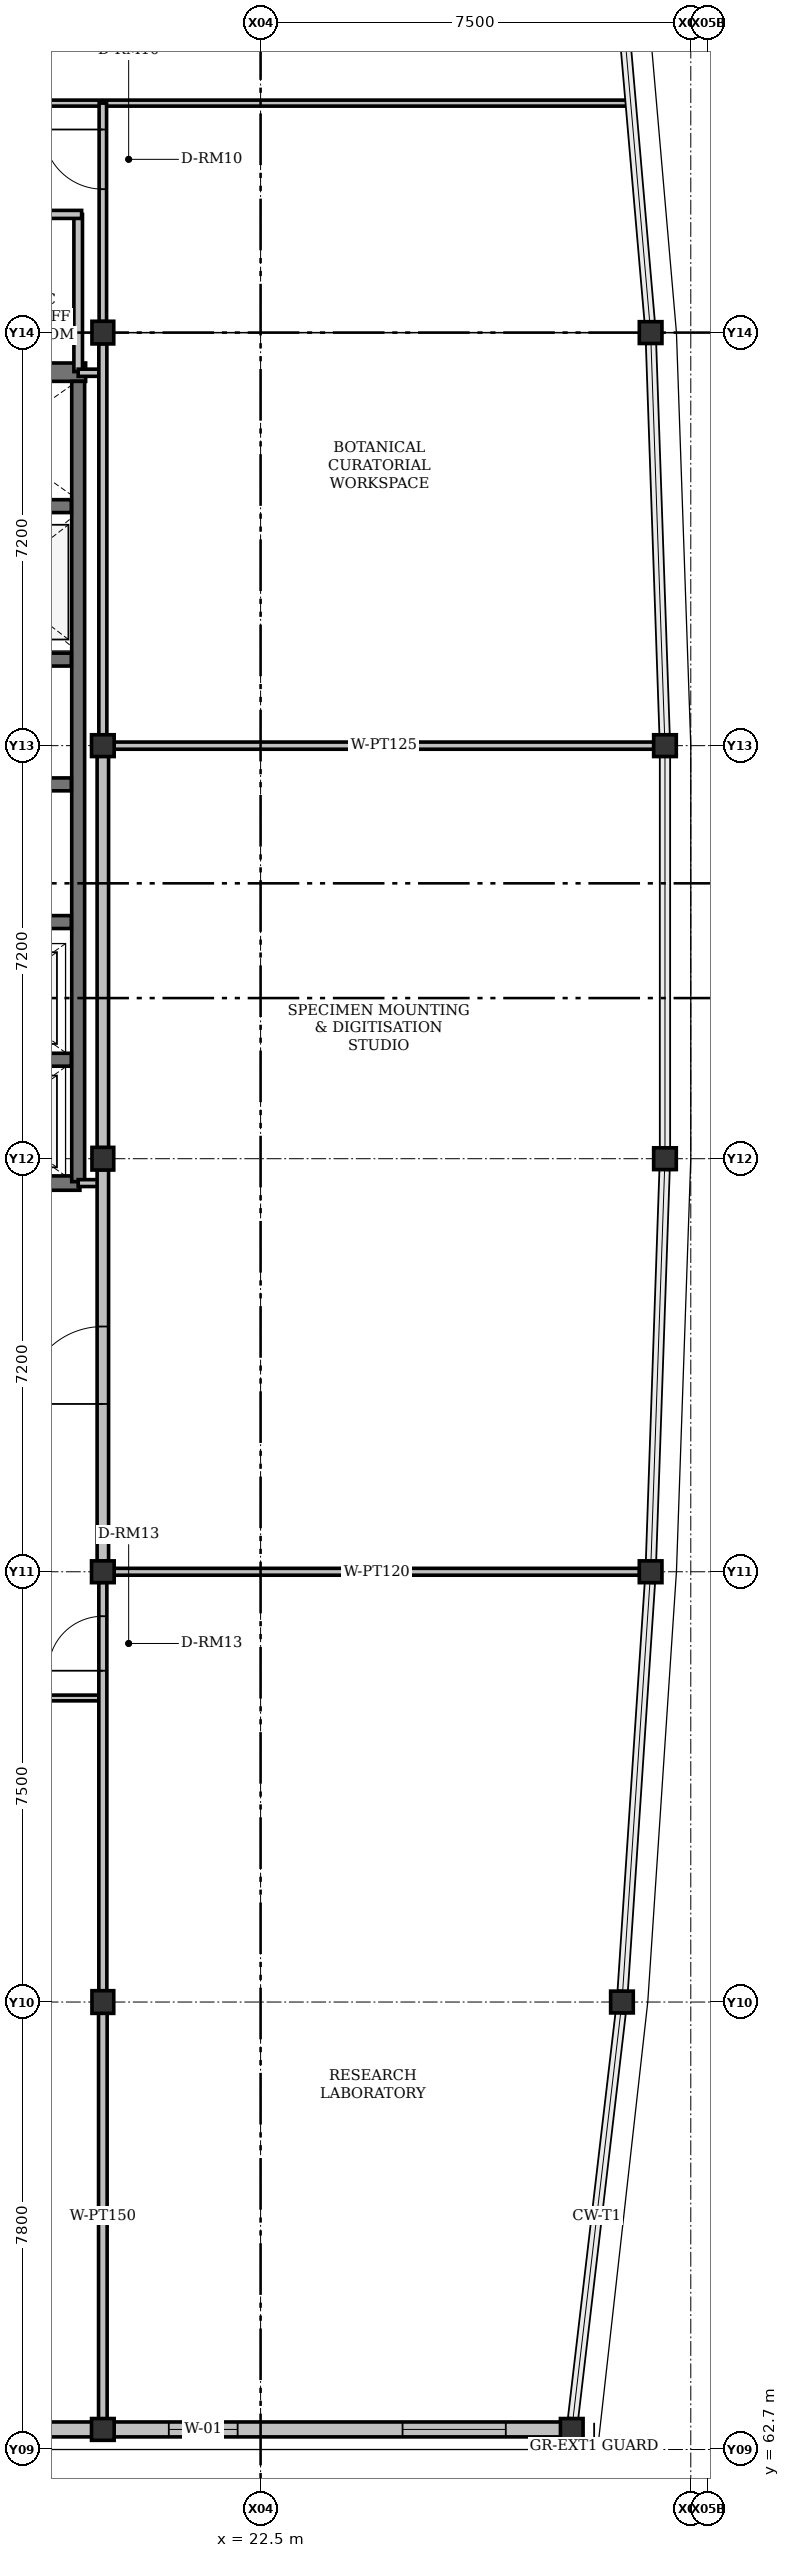
"""IFC4 building model, lengths in metres.
Left out: names, types, materials, properties, quantities, classifications, styles, units other than length and angle.
Written with IfcOpenShell. Run it as: python <this file> out.ifc"""

import sys

from ifc_helpers import new_model, si_unit, direction, frame, frame_2d, origin, origin_2d, place, context, subcontext, project, spatial, rectangle, i_section, extrude, element, fill, save


model = new_model("IFC4")
c1 = context("Model", 3, precision=1e-05, world=origin(), true_north=direction((0.0, 1.0)))
c2 = subcontext(c1, "Body", "Model", "MODEL_VIEW")
j1 = project(units=[si_unit("LENGTHUNIT", "METRE"), si_unit("PLANEANGLEUNIT", "RADIAN")], contexts=[c1])
p1 = place(None, origin())
s1 = spatial("IfcSite", under=j1, at=p1, CompositionType="ELEMENT")
p2 = place(p1, origin())
s2 = spatial("IfcBuilding", under=s1, at=p2, CompositionType="ELEMENT")
p3 = place(p2, frame((0.0, 0.0, 18.3)))
s3 = spatial("IfcBuildingStorey", under=s2, at=p3, CompositionType="ELEMENT", Elevation=18.3)
for number, where, z_axis, x_axis in (
    (1, (19.75, 63.05, 0.0), (0.0, 0.0, 1.0), (1.0, 0.0, 0.0)),
    (2, (27.925, 63.05, 0.0), (0.0, 0.0, 1.0), (1.0, 0.0, 0.0)),
    (3, (19.75, 70.5, 0.0), (0.0, 0.0, 1.0), (0.0, 1.0, 0.0)),
    (4, (28.8, 70.5, 0.0), (0.0, 0.0, 1.0), (1.0, 0.0, 0.0)),
    (5, (19.75, 78.0, 0.0), (0.0, 0.0, 1.0), (1.0, 0.0, 0.0)),
    (6, (29.3, 78.0, 0.0), (0.0, 0.0, 1.0), (1.0, 0.0, 0.0)),
    (7, (19.75, 85.2, 0.0), (0.0, 0.0, 1.0), (0.0, 1.0, 0.0)),
    (8, (29.55, 85.2, 0.0), (0.0, 0.0, 1.0), (1.0, 0.0, 0.0)),
    (9, (19.75, 92.4, 0.0), (0.0, 0.0, 1.0), (1.0, 0.0, 0.0)),
    (10, (29.55, 92.4, 0.0), (0.0, 0.0, 1.0), (1.0, 0.0, 0.0)),
    (11, (19.75, 99.6, 0.0), (0.0, 0.0, 1.0), (0.0, 1.0, 0.0)),
    (12, (29.3, 99.6, 0.0), (0.0, 0.0, 1.0), (1.0, 0.0, 0.0)),
):
    element("IfcColumn", number, at=place(p3, frame(where, z_axis=z_axis, x_axis=x_axis)), inside=s3, PredefinedType="COLUMN", context=c2, shape_type="SweptSolid", body=[
        extrude(i_section(OverallWidth=0.395, OverallDepth=0.38, WebThickness=0.019, FlangeThickness=0.03, FilletRadius=0.015, at=origin_2d()), origin(), (0.0, 0.0, 1.0), 4.2),
    ])
p4 = place(p3, frame((19.75, 63.05, 0.0), z_axis=(0.0, 0.0, 1.0), x_axis=(-1.0, 0.0, 0.0)))
e13 = element("IfcWall", 13, at=p4, inside=s3, PredefinedType="SOLIDWALL", context=c2, shape_type="SweptSolid", body=[
    extrude(rectangle(XDim=11.9, YDim=0.26, at=frame_2d((5.95, 0.0))), origin(), (0.0, 0.0, 1.0), 3.577),
])
p5 = place(p4, frame((1.15, 0.0, 0.92)))
e14 = element("IfcOpeningElement", 14, at=p5, cuts=e13, PredefinedType="OPENING", context=c2, shape_type="SweptSolid", body=[
    extrude(rectangle(XDim=2.1, YDim=1.55, at=frame_2d((1.05, 0.775))), frame((0.0, 0.13, 0.0), z_axis=(0.0, -1.0, 0.0), x_axis=(1.0, 0.0, 0.0)), (0.0, 0.0, 1.0), 0.26),
])
p6 = place(p4, frame((9.85, 0.0, 0.92)))
e15 = element("IfcOpeningElement", 15, at=p6, cuts=e13, PredefinedType="OPENING", context=c2, shape_type="SweptSolid", body=[
    extrude(rectangle(XDim=0.9, YDim=1.3, at=frame_2d((0.45, 0.65))), frame((0.0, 0.13, 0.0), z_axis=(0.0, -1.0, 0.0), x_axis=(1.0, 0.0, 0.0)), (0.0, 0.0, 1.0), 0.26),
])
p7 = place(p3, frame((27.925, 63.05, 0.0), z_axis=(0.0, 0.0, 1.0), x_axis=(-1.0, 0.0, 0.0)))
e16 = element("IfcWall", 16, at=p7, inside=s3, PredefinedType="SOLIDWALL", context=c2, shape_type="SweptSolid", body=[
    extrude(rectangle(XDim=8.175, YDim=0.26, at=frame_2d((4.087, 0.0))), origin(), (0.0, 0.0, 1.0), 2.79),
])
p8 = place(p7, frame((1.15, 0.0, 0.92)))
e17 = element("IfcOpeningElement", 17, at=p8, cuts=e16, PredefinedType="OPENING", context=c2, shape_type="SweptSolid", body=[
    extrude(rectangle(XDim=1.8, YDim=1.7, at=frame_2d((0.9, 0.85))), frame((0.0, 0.13, 0.0), z_axis=(0.0, -1.0, 0.0), x_axis=(1.0, 0.0, 0.0)), (0.0, 0.0, 1.0), 0.26),
])
p9 = place(p7, frame((5.825, 0.0, 0.92)))
e18 = element("IfcOpeningElement", 18, at=p9, cuts=e16, PredefinedType="OPENING", context=c2, shape_type="SweptSolid", body=[
    extrude(rectangle(XDim=1.2, YDim=1.4, at=frame_2d((0.6, 0.7))), frame((0.0, 0.13, 0.0), z_axis=(0.0, -1.0, 0.0), x_axis=(1.0, 0.0, 0.0)), (0.0, 0.0, 1.0), 0.26),
])
p10 = place(p3, frame((16.15, 98.91, 0.0), z_axis=(0.0, 0.0, 1.0), x_axis=(1.0, 0.0, 0.0)))
e19 = element("IfcWall", 19, at=p10, inside=s3, PredefinedType="SHEAR", context=c2, shape_type="SweptSolid", body=[
    extrude(rectangle(XDim=3.3, YDim=0.32, at=frame_2d((1.65, 0.0))), origin(), (0.0, 0.0, 1.0), 4.2),
])
p11 = place(p3, frame((16.4, 84.775, 0.0), z_axis=(0.0, 0.0, 1.0), x_axis=(1.0, 0.0, 0.0)))
e20 = element("IfcWall", 20, at=p11, inside=s3, PredefinedType="SHEAR", context=c2, shape_type="SweptSolid", body=[
    extrude(rectangle(XDim=2.95, YDim=0.25, at=frame_2d((1.475, 0.0))), origin(), (0.0, 0.0, 1.0), 4.2),
])
p12 = place(p3, frame((19.32, 84.8, 0.0), z_axis=(0.0, 0.0, 1.0), x_axis=(0.0, 1.0, 0.0)))
e21 = element("IfcWall", 21, at=p12, inside=s3, PredefinedType="SHEAR", context=c2, shape_type="SweptSolid", body=[
    extrude(rectangle(XDim=13.95, YDim=0.225, at=frame_2d((6.975, 0.0))), origin(), (0.0, 0.0, 1.0), 4.2),
])
for number, where, z_axis, x_axis in (
    (22, (16.4, 86.925, 0.0), (0.0, 0.0, 1.0), (1.0, 0.0, 0.0)),
    (23, (16.4, 89.325, 0.0), (0.0, 0.0, 1.0), (1.0, 0.0, 0.0)),
    (24, (16.4, 91.725, 0.0), (0.0, 0.0, 1.0), (1.0, 0.0, 0.0)),
    (25, (16.4, 93.9, 0.0), (0.0, 0.0, 1.0), (1.0, 0.0, 0.0)),
    (26, (16.4, 96.575, 0.0), (0.0, 0.0, 1.0), (1.0, 0.0, 0.0)),
):
    element("IfcWall", number, at=place(p3, frame(where, z_axis=z_axis, x_axis=x_axis)), inside=s3, PredefinedType="SHEAR", context=c2, shape_type="SweptSolid", body=[
        extrude(rectangle(XDim=2.8, YDim=0.225, at=frame_2d((1.4, 0.0))), origin(), (0.0, 0.0, 1.0), 4.2),
    ])
p13 = place(p3, frame((19.32, 98.92, 0.0), z_axis=(0.0, 0.0, 1.0), x_axis=(0.0, 1.0, 0.0)))
e27 = element("IfcWall", 27, at=p13, inside=s3, PredefinedType="PARTITIONING", context=c2, shape_type="SweptSolid", body=[
    extrude(rectangle(XDim=2.74, YDim=0.15, at=frame_2d((1.37, 0.0))), origin(), (0.0, 0.0, 1.0), 3.451),
])
p14 = place(p3, frame((19.38, 101.66, 0.0), z_axis=(0.0, 0.0, 1.0), x_axis=(-1.0, 0.0, 0.0)))
e28 = element("IfcWall", 28, at=p14, inside=s3, PredefinedType="PARTITIONING", context=c2, shape_type="SweptSolid", body=[
    extrude(rectangle(XDim=3.16, YDim=0.14, at=frame_2d((1.58, 0.0))), origin(), (0.0, 0.0, 1.0), 3.95),
])
p15 = place(p3, frame((19.75, 98.9, 0.0), z_axis=(0.0, 0.0, 1.0), x_axis=(-1.0, 0.0, 0.0)))
e29 = element("IfcWall", 29, at=p15, inside=s3, PredefinedType="PARTITIONING", context=c2, shape_type="SweptSolid", body=[
    extrude(rectangle(XDim=0.43, YDim=0.125, at=frame_2d((0.215, 0.0))), origin(), (0.0, 0.0, 1.0), 3.527),
])
p16 = place(p3, frame((19.32, 84.775, 0.0), z_axis=(0.0, 0.0, 1.0), x_axis=(1.0, 0.0, 0.0)))
e30 = element("IfcWall", 30, at=p16, inside=s3, PredefinedType="PARTITIONING", context=c2, shape_type="SweptSolid", body=[
    extrude(rectangle(XDim=0.43, YDim=0.12, at=frame_2d((0.215, 0.0))), origin(), (0.0, 0.0, 1.0), 3.527),
])
p17 = place(p3, frame((0.65, 103.6, 0.0), z_axis=(0.0, 0.0, 1.0), x_axis=(1.0, 0.0, 0.0)))
e31 = element("IfcWall", 31, at=p17, inside=s3, PredefinedType="PARTITIONING", context=c2, shape_type="SweptSolid", body=[
    extrude(rectangle(XDim=28.265, YDim=0.105, at=frame_2d((14.133, 0.0))), origin(), (0.0, 0.0, 1.0), 3.527),
])
p18 = place(p17, frame((9.47, 0.0, 0.0)))
e32 = element("IfcOpeningElement", 32, at=p18, cuts=e31, PredefinedType="OPENING", context=c2, shape_type="SweptSolid", body=[
    extrude(rectangle(XDim=0.96, YDim=2.15, at=frame_2d((0.48, 1.075))), frame((0.0, 0.052, 0.0), z_axis=(0.0, -1.0, 0.0), x_axis=(1.0, 0.0, 0.0)), (0.0, 0.0, 1.0), 0.105),
])
p19 = place(p17, frame((11.28, 0.0, 0.92)))
e33 = element("IfcOpeningElement", 33, at=p19, cuts=e31, PredefinedType="OPENING", context=c2, shape_type="SweptSolid", body=[
    extrude(rectangle(XDim=1.45, YDim=1.3, at=frame_2d((0.725, 0.65))), frame((0.0, 0.052, 0.0), z_axis=(0.0, -1.0, 0.0), x_axis=(1.0, 0.0, 0.0)), (0.0, 0.0, 1.0), 0.105),
])
p20 = place(p3, frame((19.75, 78.185, 0.0), z_axis=(0.0, 0.0, 1.0), x_axis=(0.0, 1.0, 0.0)))
e34 = element("IfcWall", 34, at=p20, inside=s3, PredefinedType="SOLIDWALL", context=c2, shape_type="SweptSolid", body=[
    extrude(rectangle(XDim=6.823, YDim=0.2, at=frame_2d((3.411, 0.0))), origin(), (0.0, 0.0, 1.0), 3.527),
])
p21 = place(p20, frame((2.74, 0.0, 0.0)))
e35 = element("IfcOpeningElement", 35, at=p21, cuts=e34, PredefinedType="OPENING", context=c2, shape_type="SweptSolid", body=[
    extrude(rectangle(XDim=1.35, YDim=2.25, at=frame_2d((0.675, 1.125))), frame((0.0, 0.1, 0.0), z_axis=(0.0, -1.0, 0.0), x_axis=(1.0, 0.0, 0.0)), (0.0, 0.0, 1.0), 0.2),
])
p22 = place(p3, frame((19.75, 85.393, 0.0), z_axis=(0.0, 0.0, 1.0), x_axis=(0.0, 1.0, 0.0)))
e36 = element("IfcWall", 36, at=p22, inside=s3, PredefinedType="SOLIDWALL", context=c2, shape_type="SweptSolid", body=[
    extrude(rectangle(XDim=6.823, YDim=0.2, at=frame_2d((3.411, 0.0))), origin(), (0.0, 0.0, 1.0), 3.527),
])
p23 = place(p3, frame((19.75, 92.585, 0.0), z_axis=(0.0, 0.0, 1.0), x_axis=(0.0, 1.0, 0.0)))
e37 = element("IfcWall", 37, at=p23, inside=s3, PredefinedType="PARTITIONING", context=c2, shape_type="SweptSolid", body=[
    extrude(rectangle(XDim=6.823, YDim=0.14, at=frame_2d((3.411, 0.0))), origin(), (0.0, 0.0, 1.0), 3.527),
])
p24 = place(p3, frame((19.75, 99.792, 0.0), z_axis=(0.0, 0.0, 1.0), x_axis=(0.0, 1.0, 0.0)))
e38 = element("IfcWall", 38, at=p24, inside=s3, PredefinedType="PARTITIONING", context=c2, shape_type="SweptSolid", body=[
    extrude(rectangle(XDim=3.808, YDim=0.13, at=frame_2d((1.904, 0.0))), origin(), (0.0, 0.0, 1.0), 3.527),
])
p25 = place(p24, frame((2.308, 0.0, 0.0)))
e39 = element("IfcOpeningElement", 39, at=p25, cuts=e38, PredefinedType="OPENING", context=c2, shape_type="SweptSolid", body=[
    extrude(rectangle(XDim=1.04, YDim=2.15, at=frame_2d((0.52, 1.075))), frame((0.0, 0.065, 0.0), z_axis=(0.0, -1.0, 0.0), x_axis=(1.0, 0.0, 0.0)), (0.0, 0.0, 1.0), 0.13),
])
p26 = place(p3, frame((29.357, 92.4, 0.0), z_axis=(0.0, 0.0, 1.0), x_axis=(-1.0, 0.0, 0.0)))
e40 = element("IfcWall", 40, at=p26, inside=s3, PredefinedType="PARTITIONING", context=c2, shape_type="SweptSolid", body=[
    extrude(rectangle(XDim=9.415, YDim=0.125, at=frame_2d((4.708, 0.0))), origin(), (0.0, 0.0, 1.0), 2.79),
])
p27 = place(p3, frame((29.107, 78.0, 0.0), z_axis=(0.0, 0.0, 1.0), x_axis=(-1.0, 0.0, 0.0)))
e41 = element("IfcWall", 41, at=p27, inside=s3, PredefinedType="PARTITIONING", context=c2, shape_type="SweptSolid", body=[
    extrude(rectangle(XDim=9.165, YDim=0.12, at=frame_2d((4.583, 0.0))), origin(), (0.0, 0.0, 1.0), 2.79),
])
p28 = place(p3, frame((7.85, 75.8, 0.0), z_axis=(0.0, 0.0, 1.0), x_axis=(1.0, 0.0, 0.0)))
e42 = element("IfcWall", 42, at=p28, inside=s3, PredefinedType="PARTITIONING", context=c2, shape_type="SweptSolid", body=[
    extrude(rectangle(XDim=11.9, YDim=0.1, at=frame_2d((5.95, 0.0))), origin(), (0.0, 0.0, 1.0), 3.527),
])
p29 = place(p28, frame((2.79, 0.0, 0.0)))
e43 = element("IfcOpeningElement", 43, at=p29, cuts=e42, PredefinedType="OPENING", context=c2, shape_type="SweptSolid", body=[
    extrude(rectangle(XDim=1.12, YDim=2.15, at=frame_2d((0.56, 1.075))), frame((0.0, 0.05, 0.0), z_axis=(0.0, -1.0, 0.0), x_axis=(1.0, 0.0, 0.0)), (0.0, 0.0, 1.0), 0.1),
])
p30 = place(p28, frame((4.76, 0.0, 0.92)))
e44 = element("IfcOpeningElement", 44, at=p30, cuts=e42, PredefinedType="OPENING", context=c2, shape_type="SweptSolid", body=[
    extrude(rectangle(XDim=0.85, YDim=1.1, at=frame_2d((0.425, 0.55))), frame((0.0, 0.05, 0.0), z_axis=(0.0, -1.0, 0.0), x_axis=(1.0, 0.0, 0.0)), (0.0, 0.0, 1.0), 0.1),
])
p31 = place(p3, frame((19.75, 63.235, 0.0), z_axis=(0.0, 0.0, 1.0), x_axis=(0.0, 1.0, 0.0)))
e45 = element("IfcWall", 45, at=p31, inside=s3, PredefinedType="PARTITIONING", context=c2, shape_type="SweptSolid", body=[
    extrude(rectangle(XDim=7.073, YDim=0.15, at=frame_2d((3.536, 0.0))), origin(), (0.0, 0.0, 1.0), 3.527),
])
p32 = place(p3, frame((19.75, 70.692, 0.0), z_axis=(0.0, 0.0, 1.0), x_axis=(0.0, 1.0, 0.0)))
e46 = element("IfcWall", 46, at=p32, inside=s3, PredefinedType="PARTITIONING", context=c2, shape_type="SweptSolid", body=[
    extrude(rectangle(XDim=7.123, YDim=0.14, at=frame_2d((3.561, 0.0))), origin(), (0.0, 0.0, 1.0), 3.527),
])
p33 = place(p32, frame((5.583, 0.0, 0.0)))
e47 = element("IfcOpeningElement", 47, at=p33, cuts=e46, PredefinedType="OPENING", context=c2, shape_type="SweptSolid", body=[
    extrude(rectangle(XDim=0.95, YDim=2.2, at=frame_2d((0.475, 1.1))), frame((0.0, 0.07, 0.0), z_axis=(0.0, -1.0, 0.0), x_axis=(1.0, 0.0, 0.0)), (0.0, 0.0, 1.0), 0.14),
])
p34 = place(p8, origin())
e48 = element("IfcWindow", 48, at=p34, inside=s3, PartitioningType="DOUBLE_PANEL_VERTICAL", PredefinedType="WINDOW", context=c2, shape_type="SweptSolid", body=[
    extrude(rectangle(XDim=1.8, YDim=1.7, at=frame_2d((0.9, 0.85))), frame((0.0, 0.03, 0.0), z_axis=(0.0, -1.0, 0.0), x_axis=(1.0, 0.0, 0.0)), (0.0, 0.0, 1.0), 0.06),
])
fill(e17, e48)
p35 = place(p9, origin())
e49 = element("IfcWindow", 49, at=p35, inside=s3, PartitioningType="SINGLE_PANEL", PredefinedType="WINDOW", context=c2, shape_type="SweptSolid", body=[
    extrude(rectangle(XDim=1.2, YDim=1.4, at=frame_2d((0.6, 0.7))), frame((0.0, 0.03, 0.0), z_axis=(0.0, -1.0, 0.0), x_axis=(1.0, 0.0, 0.0)), (0.0, 0.0, 1.0), 0.06),
])
fill(e18, e49)
p36 = place(p21, origin())
e50 = element("IfcDoor", 50, at=p36, inside=s3, OperationType="SINGLE_SWING_LEFT", PredefinedType="DOOR", context=c2, shape_type="SweptSolid", body=[
    extrude(rectangle(XDim=1.35, YDim=2.25, at=frame_2d((0.675, 1.125))), frame((0.0, 0.025, 0.0), z_axis=(0.0, -1.0, 0.0), x_axis=(1.0, 0.0, 0.0)), (0.0, 0.0, 1.0), 0.05),
])
fill(e35, e50)
p37 = place(p25, origin())
e51 = element("IfcDoor", 51, at=p37, inside=s3, OperationType="SINGLE_SWING_RIGHT", PredefinedType="DOOR", context=c2, shape_type="SweptSolid", body=[
    extrude(rectangle(XDim=1.04, YDim=2.15, at=frame_2d((0.52, 1.075))), frame((0.0, 0.025, 0.0), z_axis=(0.0, -1.0, 0.0), x_axis=(1.0, 0.0, 0.0)), (0.0, 0.0, 1.0), 0.05),
])
fill(e39, e51)
p38 = place(p33, origin())
e52 = element("IfcDoor", 52, at=p38, inside=s3, OperationType="SINGLE_SWING_LEFT", PredefinedType="DOOR", context=c2, shape_type="SweptSolid", body=[
    extrude(rectangle(XDim=0.95, YDim=2.2, at=frame_2d((0.475, 1.1))), frame((0.0, 0.025, 0.0), z_axis=(0.0, -1.0, 0.0), x_axis=(1.0, 0.0, 0.0)), (0.0, 0.0, 1.0), 0.05),
])
fill(e47, e52)
save(model, sys.argv[1])
